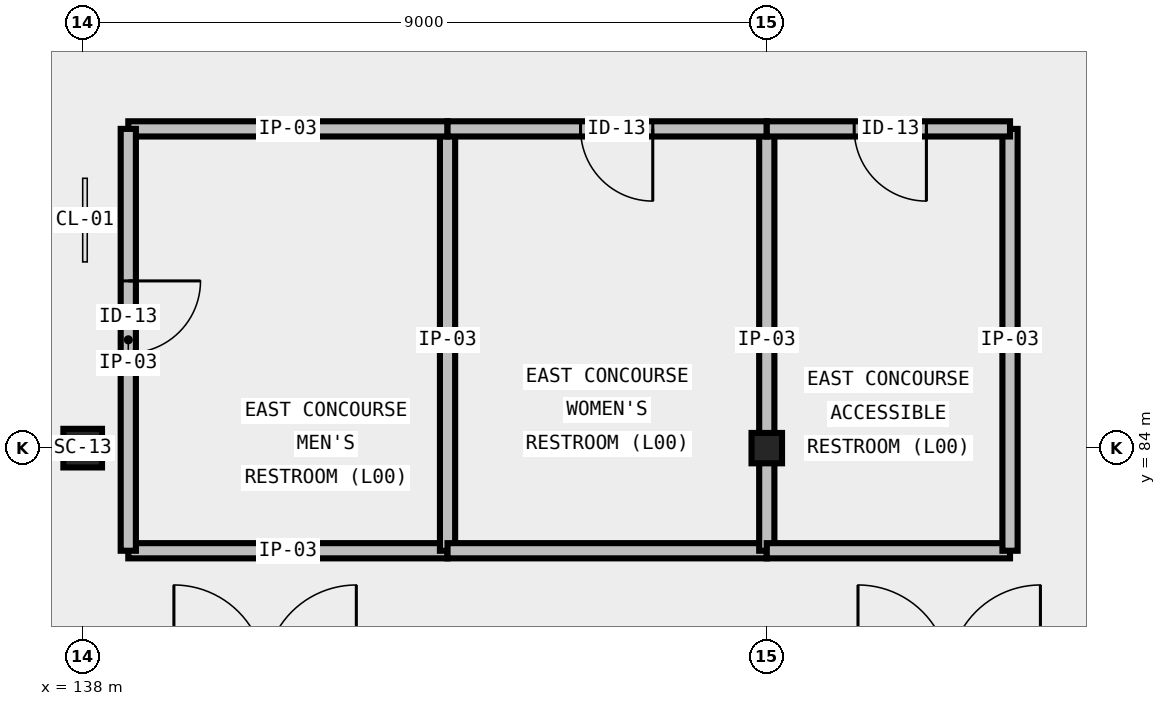
"""IFC4 building model, lengths in metres.
Left out: names, types, materials, properties, quantities, classifications, styles, units other than length and angle.
Written with IfcOpenShell. Run it as: python <this file> out.ifc"""

import sys

from ifc_helpers import new_model, si_unit, direction, frame, frame_2d, origin, origin_2d, place, context, subcontext, project, spatial, rectangle, hollow_rectangle, i_section, extrude, element, fill, save


model = new_model("IFC4")
c1 = context("Model", 3, precision=1e-05, world=origin(), true_north=direction((0.0, 1.0)))
c2 = subcontext(c1, "Body", "Model", "MODEL_VIEW")
j1 = project(units=[si_unit("LENGTHUNIT", "METRE"), si_unit("PLANEANGLEUNIT", "RADIAN")], contexts=[c1])
p1 = place(None, origin())
s1 = spatial("IfcSite", under=j1, at=p1, CompositionType="ELEMENT")
p2 = place(p1, origin())
s2 = spatial("IfcBuilding", under=s1, at=p2, CompositionType="ELEMENT")
p3 = place(p2, origin())
s3 = spatial("IfcBuildingStorey", under=s2, at=p3, CompositionType="ELEMENT", Elevation=0.0)
p4 = place(p3, frame((138.0, 84.0, 0.0), z_axis=(0.0, 0.0, 1.0), x_axis=(1.0, 0.0, 0.0)))
e1 = element("IfcColumn", 1, at=p4, inside=s3, PredefinedType="COLUMN", context=c2, shape_type="SweptSolid", body=[
    extrude(hollow_rectangle(XDim=0.508, YDim=0.508, WallThickness=0.015, at=origin_2d()), origin(), (0.0, 0.0, 1.0), 6.0),
])
p5 = place(p3, frame((147.0, 84.0, 0.0), z_axis=(0.0, 0.0, 1.0), x_axis=(1.0, 0.0, 0.0)))
e2 = element("IfcColumn", 2, at=p5, inside=s3, PredefinedType="COLUMN", context=c2, shape_type="SweptSolid", body=[
    extrude(i_section(OverallWidth=0.401, OverallDepth=0.399, WebThickness=0.025, FlangeThickness=0.04, FilletRadius=0.031, at=origin_2d()), origin(), (0.0, 0.0, 1.0), 6.0),
])
p6 = place(p3, frame((138.6, 82.65, 0.0), z_axis=(0.0, 0.0, 1.0), x_axis=(1.0, 0.0, 0.0)))
e3 = element("IfcWall", 3, at=p6, inside=s3, PredefinedType="PARTITIONING", context=c2, shape_type="SweptSolid", body=[
    extrude(rectangle(XDim=4.2, YDim=0.2, at=frame_2d((2.1, 0.0))), origin(), (0.0, 0.0, 1.0), 5.68),
])
p7 = place(p3, frame((142.8, 82.65, 0.0), z_axis=(0.0, 0.0, 1.0), x_axis=(0.0, 1.0, 0.0)))
e4 = element("IfcWall", 4, at=p7, inside=s3, PredefinedType="PARTITIONING", context=c2, shape_type="SweptSolid", body=[
    extrude(rectangle(XDim=5.55, YDim=0.2, at=frame_2d((2.775, 0.0))), origin(), (0.0, 0.0, 1.0), 5.68),
])
p8 = place(p3, frame((142.8, 88.2, 0.0), z_axis=(0.0, 0.0, 1.0), x_axis=(-1.0, 0.0, 0.0)))
e5 = element("IfcWall", 5, at=p8, inside=s3, PredefinedType="PARTITIONING", context=c2, shape_type="SweptSolid", body=[
    extrude(rectangle(XDim=4.2, YDim=0.2, at=frame_2d((2.1, 0.0))), origin(), (0.0, 0.0, 1.0), 5.68),
])
p9 = place(p3, frame((138.6, 88.2, 0.0), z_axis=(0.0, 0.0, 1.0), x_axis=(0.0, -1.0, 0.0)))
e6 = element("IfcWall", 6, at=p9, inside=s3, PredefinedType="PARTITIONING", context=c2, shape_type="SweptSolid", body=[
    extrude(rectangle(XDim=5.55, YDim=0.2, at=frame_2d((2.775, 0.0))), origin(), (0.0, 0.0, 1.0), 5.68),
])
p10 = place(p9, frame((2.0, 0.0, 0.0)))
e7 = element("IfcOpeningElement", 7, at=p10, cuts=e6, PredefinedType="OPENING", context=c2, shape_type="SweptSolid", body=[
    extrude(rectangle(XDim=0.95, YDim=2.15, at=frame_2d((0.475, 1.075))), frame((0.0, 0.115, 0.0), z_axis=(0.0, -1.0, 0.0), x_axis=(1.0, 0.0, 0.0)), (0.0, 0.0, 1.0), 0.23),
])
p11 = place(p3, frame((142.8, 82.65, 0.0), z_axis=(0.0, 0.0, 1.0), x_axis=(1.0, 0.0, 0.0)))
e8 = element("IfcWall", 8, at=p11, inside=s3, PredefinedType="PARTITIONING", context=c2, shape_type="SweptSolid", body=[
    extrude(rectangle(XDim=4.2, YDim=0.2, at=frame_2d((2.1, 0.0))), origin(), (0.0, 0.0, 1.0), 5.68),
])
p12 = place(p3, frame((147.0, 82.65, 0.0), z_axis=(0.0, 0.0, 1.0), x_axis=(0.0, 1.0, 0.0)))
e9 = element("IfcWall", 9, at=p12, inside=s3, PredefinedType="PARTITIONING", context=c2, shape_type="SweptSolid", body=[
    extrude(rectangle(XDim=5.55, YDim=0.2, at=frame_2d((2.775, 0.0))), origin(), (0.0, 0.0, 1.0), 4.83),
])
p13 = place(p3, frame((147.0, 88.2, 0.0), z_axis=(0.0, 0.0, 1.0), x_axis=(-1.0, 0.0, 0.0)))
e10 = element("IfcWall", 10, at=p13, inside=s3, PredefinedType="PARTITIONING", context=c2, shape_type="SweptSolid", body=[
    extrude(rectangle(XDim=4.2, YDim=0.2, at=frame_2d((2.1, 0.0))), origin(), (0.0, 0.0, 1.0), 5.68),
])
p14 = place(p13, frame((1.5, 0.0, 0.0)))
e11 = element("IfcOpeningElement", 11, at=p14, cuts=e10, PredefinedType="OPENING", context=c2, shape_type="SweptSolid", body=[
    extrude(rectangle(XDim=0.95, YDim=2.15, at=frame_2d((0.475, 1.075))), frame((0.0, 0.115, 0.0), z_axis=(0.0, -1.0, 0.0), x_axis=(1.0, 0.0, 0.0)), (0.0, 0.0, 1.0), 0.23),
])
p15 = place(p3, frame((147.0, 82.65, 0.0), z_axis=(0.0, 0.0, 1.0), x_axis=(1.0, 0.0, 0.0)))
e12 = element("IfcWall", 12, at=p15, inside=s3, PredefinedType="PARTITIONING", context=c2, shape_type="SweptSolid", body=[
    extrude(rectangle(XDim=3.2, YDim=0.2, at=frame_2d((1.6, 0.0))), origin(), (0.0, 0.0, 1.0), 5.68),
])
p16 = place(p3, frame((150.2, 82.65, 0.0), z_axis=(0.0, 0.0, 1.0), x_axis=(0.0, 1.0, 0.0)))
e13 = element("IfcWall", 13, at=p16, inside=s3, PredefinedType="PARTITIONING", context=c2, shape_type="SweptSolid", body=[
    extrude(rectangle(XDim=5.55, YDim=0.2, at=frame_2d((2.775, 0.0))), origin(), (0.0, 0.0, 1.0), 5.68),
])
p17 = place(p3, frame((150.2, 88.2, 0.0), z_axis=(0.0, 0.0, 1.0), x_axis=(-1.0, 0.0, 0.0)))
e14 = element("IfcWall", 14, at=p17, inside=s3, PredefinedType="PARTITIONING", context=c2, shape_type="SweptSolid", body=[
    extrude(rectangle(XDim=3.2, YDim=0.2, at=frame_2d((1.6, 0.0))), origin(), (0.0, 0.0, 1.0), 5.68),
])
p18 = place(p17, frame((1.1, 0.0, 0.0)))
e15 = element("IfcOpeningElement", 15, at=p18, cuts=e14, PredefinedType="OPENING", context=c2, shape_type="SweptSolid", body=[
    extrude(rectangle(XDim=0.95, YDim=2.15, at=frame_2d((0.475, 1.075))), frame((0.0, 0.115, 0.0), z_axis=(0.0, -1.0, 0.0), x_axis=(1.0, 0.0, 0.0)), (0.0, 0.0, 1.0), 0.23),
])
p19 = place(p10, origin())
e16 = element("IfcDoor", 16, at=p19, inside=s3, OperationType="SINGLE_SWING_LEFT", PredefinedType="DOOR", context=c2, shape_type="SweptSolid", body=[
    extrude(rectangle(XDim=0.95, YDim=2.15, at=frame_2d((0.475, 1.075))), frame((0.0, 0.025, 0.0), z_axis=(0.0, -1.0, 0.0), x_axis=(1.0, 0.0, 0.0)), (0.0, 0.0, 1.0), 0.05),
])
fill(e7, e16)
p20 = place(p14, origin())
e17 = element("IfcDoor", 17, at=p20, inside=s3, OperationType="SINGLE_SWING_LEFT", PredefinedType="DOOR", context=c2, shape_type="SweptSolid", body=[
    extrude(rectangle(XDim=0.95, YDim=2.15, at=frame_2d((0.475, 1.075))), frame((0.0, 0.025, 0.0), z_axis=(0.0, -1.0, 0.0), x_axis=(1.0, 0.0, 0.0)), (0.0, 0.0, 1.0), 0.05),
])
fill(e11, e17)
p21 = place(p18, origin())
e18 = element("IfcDoor", 18, at=p21, inside=s3, OperationType="SINGLE_SWING_LEFT", PredefinedType="DOOR", context=c2, shape_type="SweptSolid", body=[
    extrude(rectangle(XDim=0.95, YDim=2.15, at=frame_2d((0.475, 1.075))), frame((0.0, 0.025, 0.0), z_axis=(0.0, -1.0, 0.0), x_axis=(1.0, 0.0, 0.0)), (0.0, 0.0, 1.0), 0.05),
])
fill(e15, e18)
save(model, sys.argv[1])
